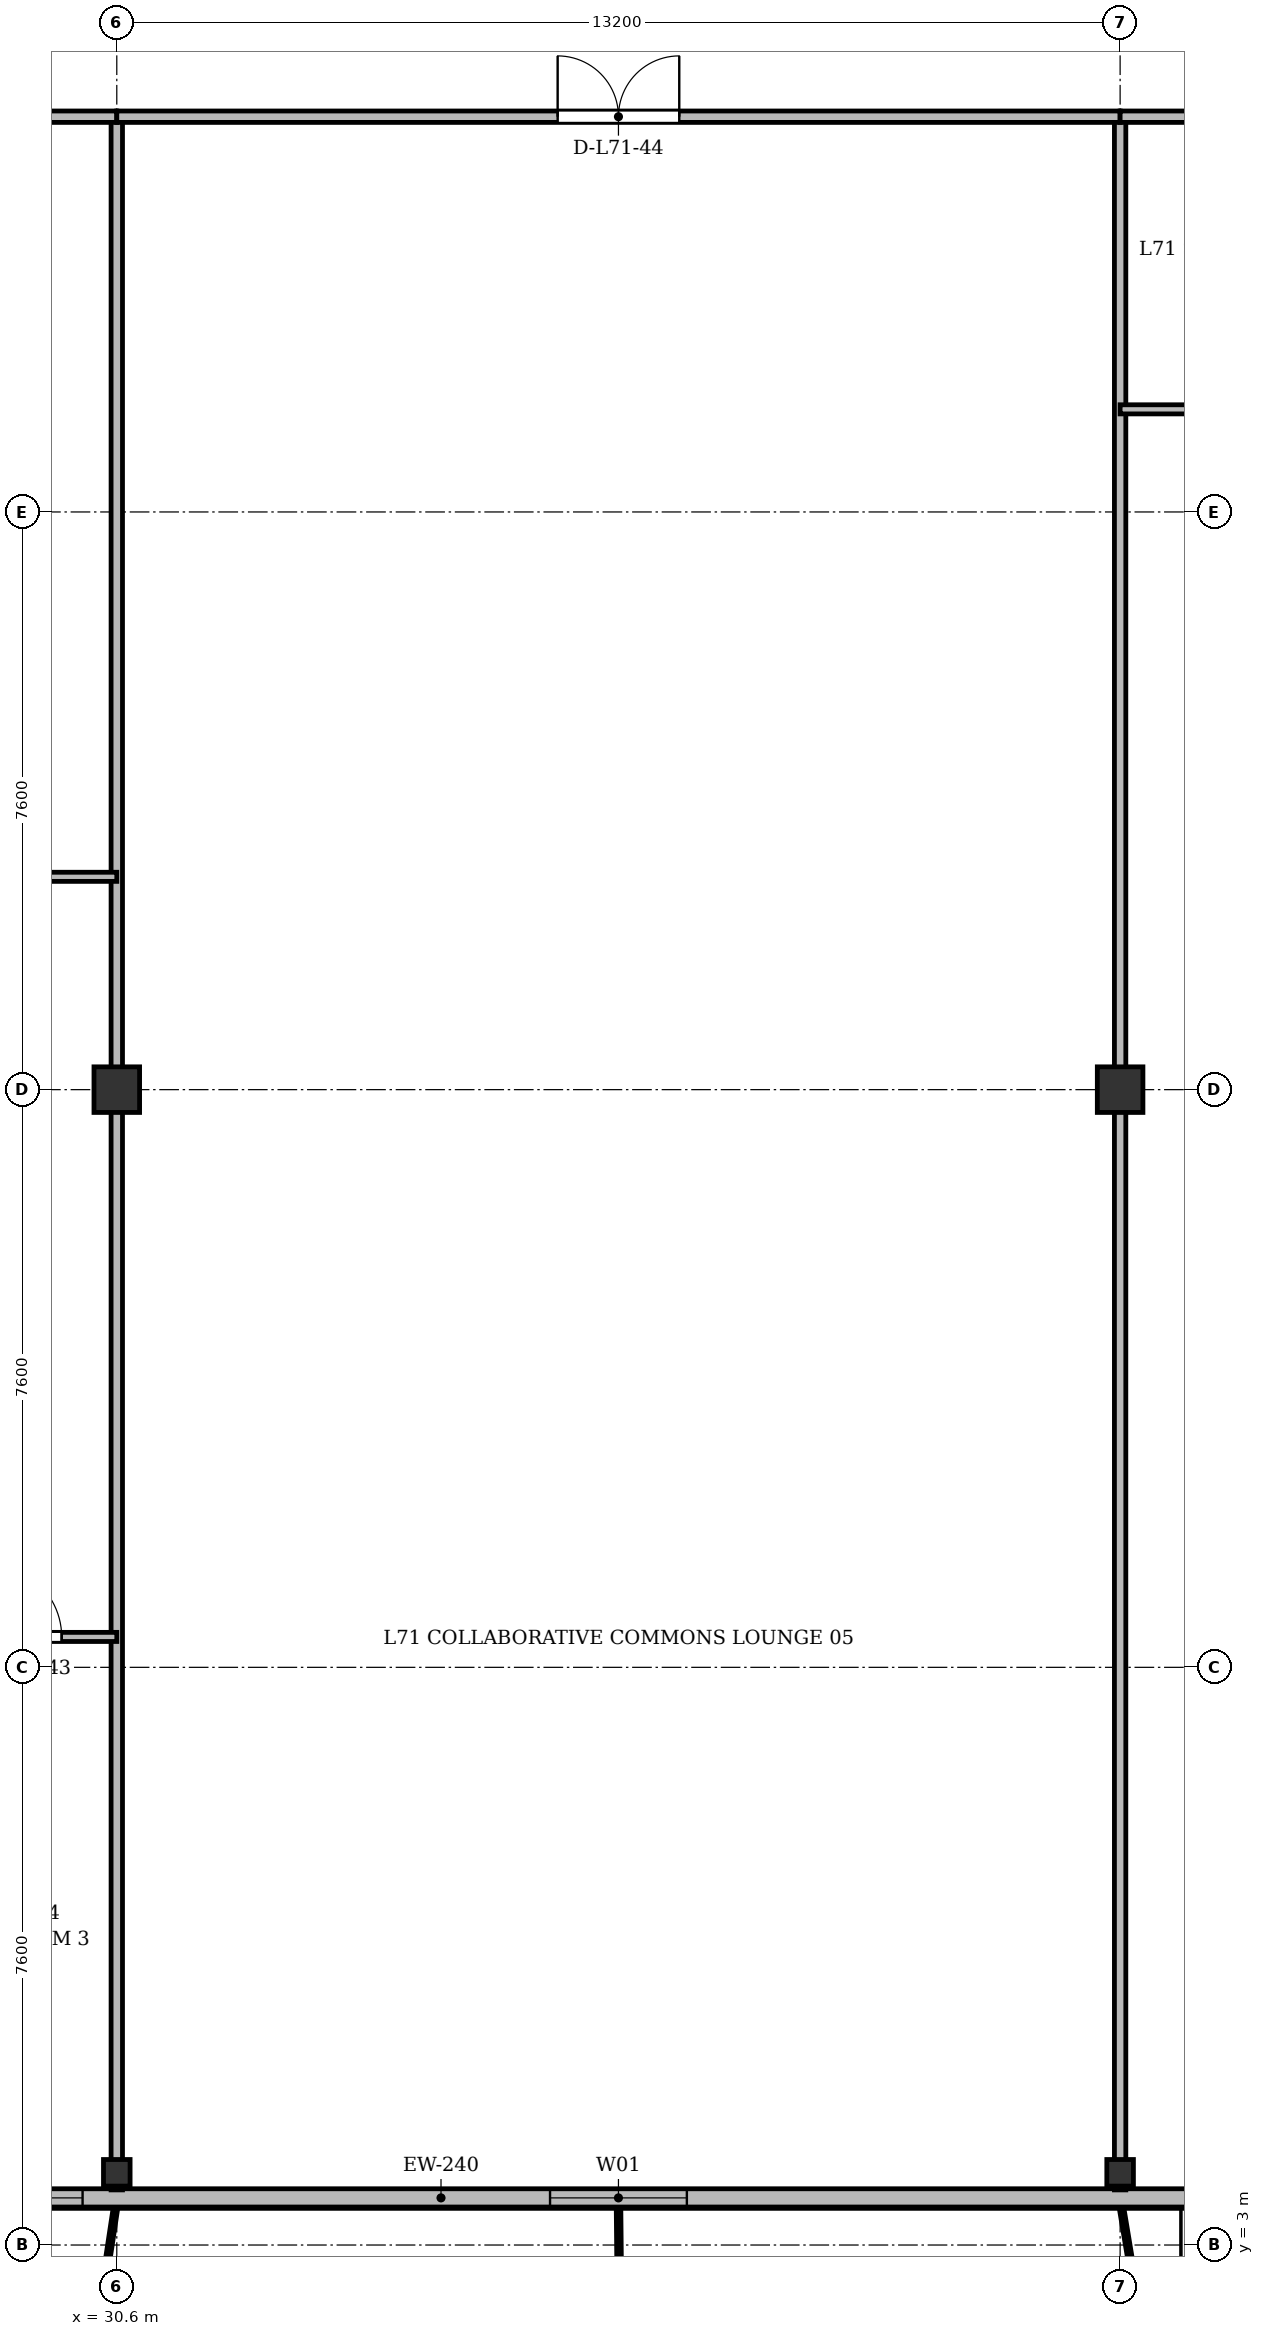
"""IFC4 building model, lengths in metres.
Left out: names, types, materials, properties, quantities, classifications, styles, units other than length and angle.
Written with IfcOpenShell. Run it as: python <this file> out.ifc"""

import sys

from ifc_helpers import new_model, si_unit, direction, frame, frame_2d, origin, origin_2d, place, context, subcontext, project, spatial, rectangle, i_section, extrude, source, transform, mapped, element, fill, save


model = new_model("IFC4")
c1 = context("Model", 3, precision=1e-05, world=origin(), true_north=direction((0.0, 1.0)))
c2 = subcontext(c1, "Body", "Model", "MODEL_VIEW")
j1 = project(units=[si_unit("LENGTHUNIT", "METRE"), si_unit("PLANEANGLEUNIT", "RADIAN")], contexts=[c1])
p1 = place(None, origin())
s1 = spatial("IfcSite", under=j1, at=p1, CompositionType="ELEMENT")
p2 = place(p1, origin())
s2 = spatial("IfcBuilding", under=s1, at=p2, CompositionType="ELEMENT")
p3 = place(p2, frame((0.0, 0.0, 273.9)))
s3 = spatial("IfcBuildingStorey", under=s2, at=p3, CompositionType="ELEMENT", Elevation=273.9)
m1 = source(origin(), c2, "Body", "SweptSolid", [
    extrude(i_section(OverallWidth=0.35, OverallDepth=0.35, WebThickness=0.018, FlangeThickness=0.028, at=origin_2d()), origin(), (0.0, 0.0, 1.0), 3.6),
])
p4 = place(p3, frame((30.6, 3.95, 0.0), z_axis=(0.0, 0.0, 1.0), x_axis=(1.0, 0.0, 0.0)))
e1 = element("IfcColumn", 1, at=p4, inside=s3, PredefinedType="COLUMN", context=c2, shape_type="MappedRepresentation", body=[
    mapped(m1, transform((0.0, 0.0, 0.0), x_axis=(1.0, 0.0, 0.0), y_axis=(0.0, 1.0, 0.0), z_axis=(0.0, 0.0, 1.0), scale=1.0)),
])
m2 = source(origin(), c2, "Body", "SweptSolid", [
    extrude(rectangle(XDim=0.6, YDim=0.6, at=origin_2d()), origin(), (0.0, 0.0, 1.0), 3.6),
])
p5 = place(p3, frame((30.6, 18.2, 0.0), z_axis=(0.0, 0.0, 1.0), x_axis=(1.0, 0.0, 0.0)))
e2 = element("IfcColumn", 2, at=p5, inside=s3, PredefinedType="COLUMN", context=c2, shape_type="MappedRepresentation", body=[
    mapped(m2, transform((0.0, 0.0, 0.0), x_axis=(1.0, 0.0, 0.0), y_axis=(0.0, 1.0, 0.0), z_axis=(0.0, 0.0, 1.0), scale=1.0)),
])
p6 = place(p3, frame((43.8, 3.95, 0.0), z_axis=(0.0, 0.0, 1.0), x_axis=(1.0, 0.0, 0.0)))
e3 = element("IfcColumn", 3, at=p6, inside=s3, PredefinedType="COLUMN", context=c2, shape_type="MappedRepresentation", body=[
    mapped(m1, transform((0.0, 0.0, 0.0), x_axis=(1.0, 0.0, 0.0), y_axis=(0.0, 1.0, 0.0), z_axis=(0.0, 0.0, 1.0), scale=1.0)),
])
p7 = place(p3, frame((43.8, 18.2, 0.0), z_axis=(0.0, 0.0, 1.0), x_axis=(1.0, 0.0, 0.0)))
e4 = element("IfcColumn", 4, at=p7, inside=s3, PredefinedType="COLUMN", context=c2, shape_type="MappedRepresentation", body=[
    mapped(m2, transform((0.0, 0.0, 0.0), x_axis=(1.0, 0.0, 0.0), y_axis=(0.0, 1.0, 0.0), z_axis=(0.0, 0.0, 1.0), scale=1.0)),
])
p8 = place(p3, frame((63.2, 3.62, 0.0), z_axis=(0.0, 0.0, 1.0), x_axis=(-1.0, 0.0, 0.0)))
e5 = element("IfcWall", 5, at=p8, inside=s3, PredefinedType="SOLIDWALL", context=c2, shape_type="SweptSolid", body=[
    extrude(rectangle(XDim=52.0, YDim=0.24, at=frame_2d((26.0, 0.0))), origin(), (0.0, 0.0, 1.0), 3.37),
])
p9 = place(p8, frame((1.145, 0.0, 0.9)))
e6 = element("IfcOpeningElement", 6, at=p9, cuts=e5, PredefinedType="OPENING", context=c2, shape_type="SweptSolid", body=[
    extrude(rectangle(XDim=2.2, YDim=1.8, at=frame_2d((1.1, 0.9))), frame((0.0, 0.13, 0.0), z_axis=(0.0, -1.0, 0.0), x_axis=(1.0, 0.0, 0.0)), (0.0, 0.0, 1.0), 0.26),
])
p10 = place(p8, frame((5.45, 0.0, 0.9)))
e7 = element("IfcOpeningElement", 7, at=p10, cuts=e5, PredefinedType="OPENING", context=c2, shape_type="SweptSolid", body=[
    extrude(rectangle(XDim=1.5, YDim=1.75, at=frame_2d((0.75, 0.875))), frame((0.0, 0.13, 0.0), z_axis=(0.0, -1.0, 0.0), x_axis=(1.0, 0.0, 0.0)), (0.0, 0.0, 1.0), 0.26),
])
p11 = place(p8, frame((9.1, 0.0, 0.9)))
e8 = element("IfcOpeningElement", 8, at=p11, cuts=e5, PredefinedType="OPENING", context=c2, shape_type="SweptSolid", body=[
    extrude(rectangle(XDim=2.0, YDim=1.95, at=frame_2d((1.0, 0.975))), frame((0.0, 0.13, 0.0), z_axis=(0.0, -1.0, 0.0), x_axis=(1.0, 0.0, 0.0)), (0.0, 0.0, 1.0), 0.26),
])
p12 = place(p8, frame((14.017, 0.0, 0.0)))
e9 = element("IfcOpeningElement", 9, at=p12, cuts=e5, PredefinedType="OPENING", context=c2, shape_type="SweptSolid", body=[
    extrude(rectangle(XDim=1.2, YDim=2.2, at=frame_2d((0.6, 1.1))), frame((0.0, 0.13, 0.0), z_axis=(0.0, -1.0, 0.0), x_axis=(1.0, 0.0, 0.0)), (0.0, 0.0, 1.0), 0.26),
])
p13 = place(p8, frame((25.1, 0.0, 0.9)))
e10 = element("IfcOpeningElement", 10, at=p13, cuts=e5, PredefinedType="OPENING", context=c2, shape_type="SweptSolid", body=[
    extrude(rectangle(XDim=1.8, YDim=1.8, at=frame_2d((0.9, 0.9))), frame((0.0, 0.13, 0.0), z_axis=(0.0, -1.0, 0.0), x_axis=(1.0, 0.0, 0.0)), (0.0, 0.0, 1.0), 0.26),
])
p14 = place(p8, frame((33.05, 0.0, 0.9)))
e11 = element("IfcOpeningElement", 11, at=p14, cuts=e5, PredefinedType="OPENING", context=c2, shape_type="SweptSolid", body=[
    extrude(rectangle(XDim=1.5, YDim=1.75, at=frame_2d((0.75, 0.875))), frame((0.0, 0.13, 0.0), z_axis=(0.0, -1.0, 0.0), x_axis=(1.0, 0.0, 0.0)), (0.0, 0.0, 1.0), 0.26),
])
p15 = place(p8, frame((35.45, 0.0, 0.9)))
e12 = element("IfcOpeningElement", 12, at=p15, cuts=e5, PredefinedType="OPENING", context=c2, shape_type="SweptSolid", body=[
    extrude(rectangle(XDim=1.5, YDim=1.75, at=frame_2d((0.75, 0.875))), frame((0.0, 0.13, 0.0), z_axis=(0.0, -1.0, 0.0), x_axis=(1.0, 0.0, 0.0)), (0.0, 0.0, 1.0), 0.26),
])
p16 = place(p8, frame((37.85, 0.0, 0.9)))
e13 = element("IfcOpeningElement", 13, at=p16, cuts=e5, PredefinedType="OPENING", context=c2, shape_type="SweptSolid", body=[
    extrude(rectangle(XDim=1.5, YDim=1.75, at=frame_2d((0.75, 0.875))), frame((0.0, 0.13, 0.0), z_axis=(0.0, -1.0, 0.0), x_axis=(1.0, 0.0, 0.0)), (0.0, 0.0, 1.0), 0.26),
])
p17 = place(p8, frame((41.452, 0.0, 0.0)))
e14 = element("IfcOpeningElement", 14, at=p17, cuts=e5, PredefinedType="OPENING", context=c2, shape_type="SweptSolid", body=[
    extrude(rectangle(XDim=1.2, YDim=2.2, at=frame_2d((0.6, 1.1))), frame((0.0, 0.13, 0.0), z_axis=(0.0, -1.0, 0.0), x_axis=(1.0, 0.0, 0.0)), (0.0, 0.0, 1.0), 0.26),
])
p18 = place(p8, frame((44.5, 0.0, 0.9)))
e15 = element("IfcOpeningElement", 15, at=p18, cuts=e5, PredefinedType="OPENING", context=c2, shape_type="SweptSolid", body=[
    extrude(rectangle(XDim=1.8, YDim=1.8, at=frame_2d((0.9, 0.9))), frame((0.0, 0.13, 0.0), z_axis=(0.0, -1.0, 0.0), x_axis=(1.0, 0.0, 0.0)), (0.0, 0.0, 1.0), 0.26),
])
p19 = place(p8, frame((48.655, 0.0, 0.9)))
e16 = element("IfcOpeningElement", 16, at=p19, cuts=e5, PredefinedType="OPENING", context=c2, shape_type="SweptSolid", body=[
    extrude(rectangle(XDim=2.2, YDim=1.8, at=frame_2d((1.1, 0.9))), frame((0.0, 0.13, 0.0), z_axis=(0.0, -1.0, 0.0), x_axis=(1.0, 0.0, 0.0)), (0.0, 0.0, 1.0), 0.26),
])
for number, where, z_axis, x_axis in (
    (17, (30.6, 3.725, 0.0), (0.0, 0.0, 1.0), (0.0, 1.0, 0.0)),
    (18, (43.8, 3.725, 0.0), (0.0, 0.0, 1.0), (0.0, 1.0, 0.0)),
):
    element("IfcWall", number, at=place(p3, frame(where, z_axis=z_axis, x_axis=x_axis)), inside=s3, PredefinedType="PARTITIONING", context=c2, shape_type="SweptSolid", body=[
        extrude(rectangle(XDim=27.275, YDim=0.15, at=frame_2d((13.637, 0.0))), origin(), (0.0, 0.0, 1.0), 2.87),
    ])
p20 = place(p3, frame((23.4, 21.0, 0.0), z_axis=(0.0, 0.0, 1.0), x_axis=(1.0, 0.0, 0.0)))
e19 = element("IfcWall", 19, at=p20, inside=s3, PredefinedType="PARTITIONING", context=c2, shape_type="SweptSolid", body=[
    extrude(rectangle(XDim=7.2, YDim=0.12, at=frame_2d((3.6, 0.0))), origin(), (0.0, 0.0, 1.0), 2.87),
])
p21 = place(p20, frame((3.125, 0.0, 0.0)))
e20 = element("IfcOpeningElement", 20, at=p21, cuts=e19, PredefinedType="OPENING", context=c2, shape_type="SweptSolid", body=[
    extrude(rectangle(XDim=0.95, YDim=2.15, at=frame_2d((0.475, 1.075))), frame((0.0, 0.07, 0.0), z_axis=(0.0, -1.0, 0.0), x_axis=(1.0, 0.0, 0.0)), (0.0, 0.0, 1.0), 0.14),
])
p22 = place(p3, frame((23.4, 31.0, 0.0), z_axis=(0.0, 0.0, 1.0), x_axis=(1.0, 0.0, 0.0)))
e21 = element("IfcWall", 21, at=p22, inside=s3, PredefinedType="PARTITIONING", context=c2, shape_type="SweptSolid", body=[
    extrude(rectangle(XDim=7.2, YDim=0.15, at=frame_2d((3.6, 0.0))), origin(), (0.0, 0.0, 1.0), 2.87),
])
p23 = place(p22, frame((4.706, 0.0, 0.0)))
e22 = element("IfcOpeningElement", 22, at=p23, cuts=e21, PredefinedType="OPENING", context=c2, shape_type="SweptSolid", body=[
    extrude(rectangle(XDim=0.95, YDim=2.15, at=frame_2d((0.475, 1.075))), frame((0.0, 0.085, 0.0), z_axis=(0.0, -1.0, 0.0), x_axis=(1.0, 0.0, 0.0)), (0.0, 0.0, 1.0), 0.17),
])
p24 = place(p3, frame((28.2, 11.0, 0.0), z_axis=(0.0, 0.0, 1.0), x_axis=(1.0, 0.0, 0.0)))
e23 = element("IfcWall", 23, at=p24, inside=s3, PredefinedType="PARTITIONING", context=c2, shape_type="SweptSolid", body=[
    extrude(rectangle(XDim=2.4, YDim=0.12, at=frame_2d((1.2, 0.0))), origin(), (0.0, 0.0, 1.0), 2.87),
])
p25 = place(p24, frame((0.725, 0.0, 0.0)))
e24 = element("IfcOpeningElement", 24, at=p25, cuts=e23, PredefinedType="OPENING", context=c2, shape_type="SweptSolid", body=[
    extrude(rectangle(XDim=0.95, YDim=2.15, at=frame_2d((0.475, 1.075))), frame((0.0, 0.07, 0.0), z_axis=(0.0, -1.0, 0.0), x_axis=(1.0, 0.0, 0.0)), (0.0, 0.0, 1.0), 0.14),
])
p26 = place(p3, frame((30.6, 31.0, 0.0), z_axis=(0.0, 0.0, 1.0), x_axis=(1.0, 0.0, 0.0)))
e25 = element("IfcWall", 25, at=p26, inside=s3, PredefinedType="PARTITIONING", context=c2, shape_type="SweptSolid", body=[
    extrude(rectangle(XDim=13.2, YDim=0.15, at=frame_2d((6.6, 0.0))), origin(), (0.0, 0.0, 1.0), 2.87),
])
p27 = place(p26, frame((5.8, 0.0, 0.0)))
e26 = element("IfcOpeningElement", 26, at=p27, cuts=e25, PredefinedType="OPENING", context=c2, shape_type="SweptSolid", body=[
    extrude(rectangle(XDim=1.6, YDim=2.2, at=frame_2d((0.8, 1.1))), frame((0.0, 0.085, 0.0), z_axis=(0.0, -1.0, 0.0), x_axis=(1.0, 0.0, 0.0)), (0.0, 0.0, 1.0), 0.17),
])
p28 = place(p3, frame((43.8, 31.0, 0.0), z_axis=(0.0, 0.0, 1.0), x_axis=(1.0, 0.0, 0.0)))
e27 = element("IfcWall", 27, at=p28, inside=s3, PredefinedType="PARTITIONING", context=c2, shape_type="SweptSolid", body=[
    extrude(rectangle(XDim=7.2, YDim=0.15, at=frame_2d((3.6, 0.0))), origin(), (0.0, 0.0, 1.0), 2.87),
])
p29 = place(p28, frame((3.125, 0.0, 0.0)))
e28 = element("IfcOpeningElement", 28, at=p29, cuts=e27, PredefinedType="OPENING", context=c2, shape_type="SweptSolid", body=[
    extrude(rectangle(XDim=0.95, YDim=2.15, at=frame_2d((0.475, 1.075))), frame((0.0, 0.085, 0.0), z_axis=(0.0, -1.0, 0.0), x_axis=(1.0, 0.0, 0.0)), (0.0, 0.0, 1.0), 0.17),
])
p30 = place(p3, frame((43.8, 27.15, 0.0), z_axis=(0.0, 0.0, 1.0), x_axis=(1.0, 0.0, 0.0)))
e29 = element("IfcWall", 29, at=p30, inside=s3, PredefinedType="PARTITIONING", context=c2, shape_type="SweptSolid", body=[
    extrude(rectangle(XDim=7.2, YDim=0.12, at=frame_2d((3.6, 0.0))), origin(), (0.0, 0.0, 1.0), 2.87),
])
p31 = place(p30, frame((3.125, 0.0, 0.0)))
e30 = element("IfcOpeningElement", 30, at=p31, cuts=e29, PredefinedType="OPENING", context=c2, shape_type="SweptSolid", body=[
    extrude(rectangle(XDim=0.95, YDim=2.15, at=frame_2d((0.475, 1.075))), frame((0.0, 0.07, 0.0), z_axis=(0.0, -1.0, 0.0), x_axis=(1.0, 0.0, 0.0)), (0.0, 0.0, 1.0), 0.14),
])
m3 = source(origin(), c2, "Body", "SweptSolid", [
    extrude(rectangle(XDim=1.8, YDim=1.8, at=frame_2d((0.9, 0.9))), frame((0.0, 0.03, 0.0), z_axis=(0.0, -1.0, 0.0), x_axis=(1.0, 0.0, 0.0)), (0.0, 0.0, 1.0), 0.06),
])
p32 = place(p13, origin())
e31 = element("IfcWindow", 31, at=p32, inside=s3, PartitioningType="SINGLE_PANEL", PredefinedType="WINDOW", context=c2, shape_type="MappedRepresentation", body=[
    mapped(m3, transform((0.0, 0.0, 0.0), x_axis=(1.0, 0.0, 0.0), y_axis=(0.0, 1.0, 0.0), z_axis=(0.0, 0.0, 1.0), scale=1.0)),
])
fill(e10, e31)
m4 = source(origin(), c2, "Body", "SweptSolid", [
    extrude(rectangle(XDim=1.5, YDim=1.75, at=frame_2d((0.75, 0.875))), frame((0.0, 0.03, 0.0), z_axis=(0.0, -1.0, 0.0), x_axis=(1.0, 0.0, 0.0)), (0.0, 0.0, 1.0), 0.06),
])
p33 = place(p14, origin())
e32 = element("IfcWindow", 32, at=p33, inside=s3, PartitioningType="SINGLE_PANEL", PredefinedType="WINDOW", context=c2, shape_type="MappedRepresentation", body=[
    mapped(m4, transform((0.0, 0.0, 0.0), x_axis=(1.0, 0.0, 0.0), y_axis=(0.0, 1.0, 0.0), z_axis=(0.0, 0.0, 1.0), scale=1.0)),
])
fill(e11, e32)
m5 = source(origin(), c2, "Body", "SweptSolid", [
    extrude(rectangle(XDim=0.95, YDim=2.15, at=frame_2d((0.475, 1.075))), frame((0.0, 0.025, 0.0), z_axis=(0.0, -1.0, 0.0), x_axis=(1.0, 0.0, 0.0)), (0.0, 0.0, 1.0), 0.05),
])
p34 = place(p25, origin())
e33 = element("IfcDoor", 33, at=p34, inside=s3, OperationType="SINGLE_SWING_LEFT", PredefinedType="DOOR", context=c2, shape_type="MappedRepresentation", body=[
    mapped(m5, transform((0.0, 0.0, 0.0), x_axis=(1.0, 0.0, 0.0), y_axis=(0.0, 1.0, 0.0), z_axis=(0.0, 0.0, 1.0), scale=1.0)),
])
fill(e24, e33)
m6 = source(origin(), c2, "Body", "SweptSolid", [
    extrude(rectangle(XDim=1.6, YDim=2.2, at=frame_2d((0.8, 1.1))), frame((0.0, 0.025, 0.0), z_axis=(0.0, -1.0, 0.0), x_axis=(1.0, 0.0, 0.0)), (0.0, 0.0, 1.0), 0.05),
])
p35 = place(p27, origin())
e34 = element("IfcDoor", 34, at=p35, inside=s3, OperationType="DOUBLE_DOOR_SINGLE_SWING", PredefinedType="DOOR", context=c2, shape_type="MappedRepresentation", body=[
    mapped(m6, transform((0.0, 0.0, 0.0), x_axis=(1.0, 0.0, 0.0), y_axis=(0.0, 1.0, 0.0), z_axis=(0.0, 0.0, 1.0), scale=1.0)),
])
fill(e26, e34)
save(model, sys.argv[1])
